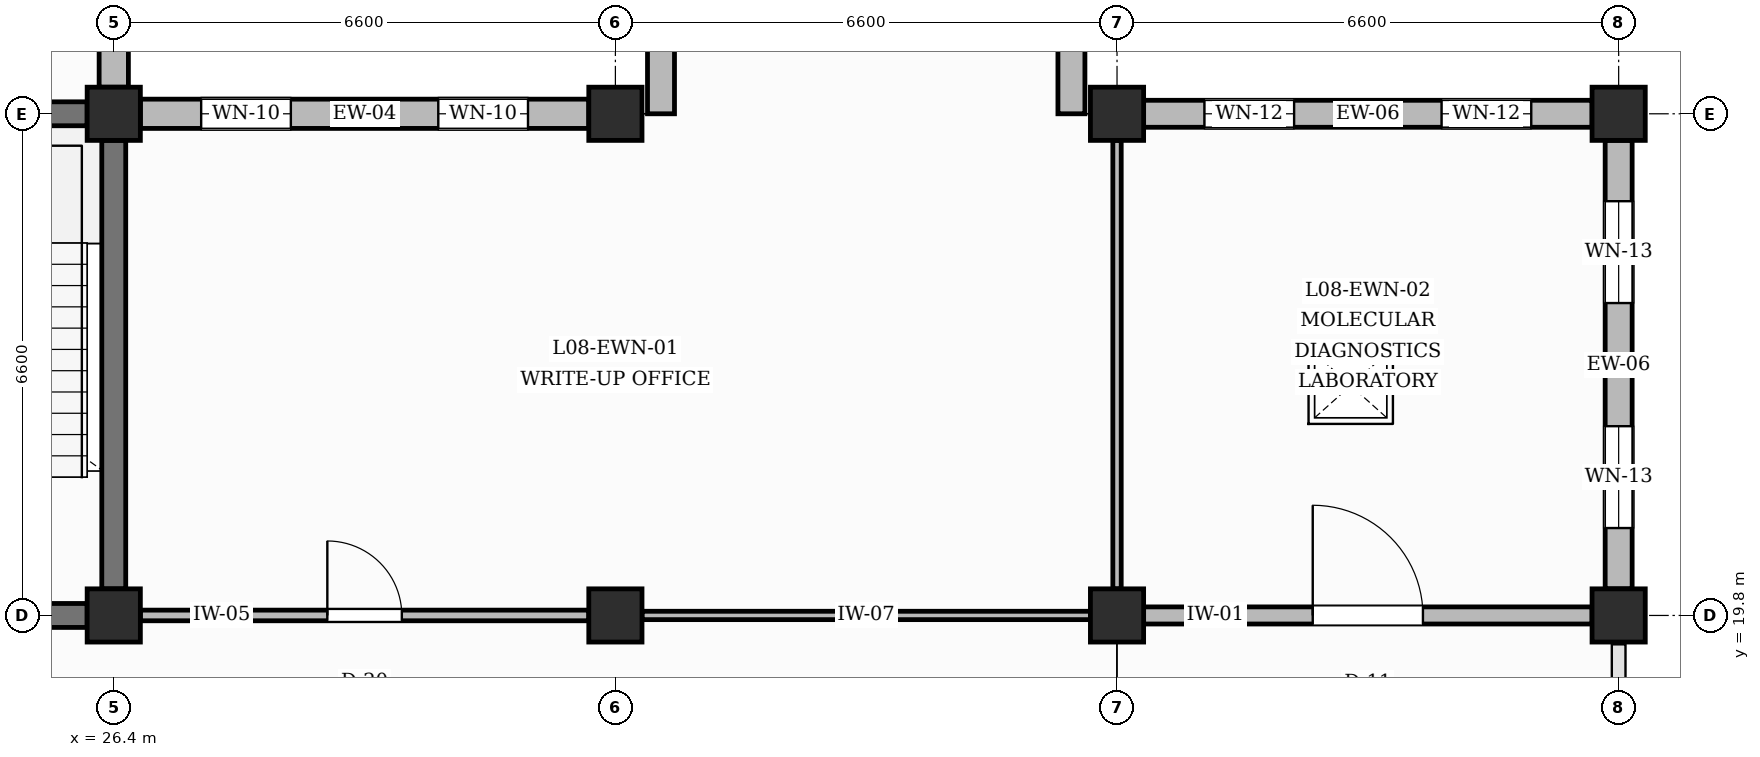
"""IFC4 building model, lengths in metres.
Left out: names, types, materials, properties, quantities, classifications, styles, units other than length and angle.
Written with IfcOpenShell. Run it as: python <this file> out.ifc"""

import sys

from ifc_helpers import new_model, si_unit, direction, frame, frame_2d, origin, origin_2d, place, context, subcontext, project, spatial, rectangle, extrude, element, fill, save


model = new_model("IFC4")
c1 = context("Model", 3, precision=1e-05, world=origin(), true_north=direction((0.0, 1.0)))
c2 = subcontext(c1, "Body", "Model", "MODEL_VIEW")
j1 = project(units=[si_unit("LENGTHUNIT", "METRE"), si_unit("PLANEANGLEUNIT", "RADIAN")], contexts=[c1])
p1 = place(None, origin())
s1 = spatial("IfcSite", under=j1, at=p1, CompositionType="ELEMENT")
p2 = place(p1, origin())
s2 = spatial("IfcBuilding", under=s1, at=p2, CompositionType="ELEMENT")
p3 = place(p2, frame((0.0, 0.0, 35.4)))
s3 = spatial("IfcBuildingStorey", under=s2, at=p3, CompositionType="ELEMENT", Elevation=35.4)
for number, where, z_axis, x_axis in (
    (1, (26.4, 19.8, 0.0), (0.0, 0.0, 1.0), (1.0, 0.0, 0.0)),
    (2, (26.4, 26.4, 0.0), (0.0, 0.0, 1.0), (1.0, 0.0, 0.0)),
    (3, (33.0, 19.8, 0.0), (0.0, 0.0, 1.0), (1.0, 0.0, 0.0)),
    (4, (33.0, 26.4, 0.0), (0.0, 0.0, 1.0), (1.0, 0.0, 0.0)),
    (5, (39.6, 19.8, 0.0), (0.0, 0.0, 1.0), (1.0, 0.0, 0.0)),
    (6, (39.6, 26.4, 0.0), (0.0, 0.0, 1.0), (1.0, 0.0, 0.0)),
    (7, (46.2, 19.8, 0.0), (0.0, 0.0, 1.0), (1.0, 0.0, 0.0)),
    (8, (46.2, 26.4, 0.0), (0.0, 0.0, 1.0), (1.0, 0.0, 0.0)),
):
    element("IfcColumn", number, at=place(p3, frame(where, z_axis=z_axis, x_axis=x_axis)), inside=s3, PredefinedType="COLUMN", context=c2, shape_type="SweptSolid", body=[
        extrude(rectangle(XDim=0.7, YDim=0.7, at=origin_2d()), origin(), (0.0, 0.0, 1.0), 4.2),
    ])
p4 = place(p3, frame((26.4, 26.75, 0.0), z_axis=(0.0, 0.0, 1.0), x_axis=(0.0, 1.0, 0.0)))
e9 = element("IfcWall", 9, at=p4, inside=s3, PredefinedType="SOLIDWALL", context=c2, shape_type="SweptSolid", body=[
    extrude(rectangle(XDim=5.9, YDim=0.385, at=frame_2d((2.95, 0.0))), origin(), (0.0, 0.0, 1.0), 3.28),
])
p5 = place(p4, frame((0.8, 0.0, 0.95)))
e10 = element("IfcOpeningElement", 10, at=p5, cuts=e9, PredefinedType="OPENING", context=c2, shape_type="SweptSolid", body=[
    extrude(rectangle(XDim=1.02, YDim=1.96, at=frame_2d((0.51, 0.98))), frame((0.0, 0.202, 0.0), z_axis=(0.0, -1.0, 0.0), x_axis=(1.0, 0.0, 0.0)), (0.0, 0.0, 1.0), 0.405),
])
p6 = place(p4, frame((4.08, 0.0, 0.95)))
e11 = element("IfcOpeningElement", 11, at=p6, cuts=e9, PredefinedType="OPENING", context=c2, shape_type="SweptSolid", body=[
    extrude(rectangle(XDim=1.02, YDim=1.96, at=frame_2d((0.51, 0.98))), frame((0.0, 0.202, 0.0), z_axis=(0.0, -1.0, 0.0), x_axis=(1.0, 0.0, 0.0)), (0.0, 0.0, 1.0), 0.405),
])
p7 = place(p3, frame((26.75, 26.4, 0.0), z_axis=(0.0, 0.0, 1.0), x_axis=(1.0, 0.0, 0.0)))
e12 = element("IfcWall", 12, at=p7, inside=s3, PredefinedType="SOLIDWALL", context=c2, shape_type="SweptSolid", body=[
    extrude(rectangle(XDim=5.9, YDim=0.385, at=frame_2d((2.95, 0.0))), origin(), (0.0, 0.0, 1.0), 3.28),
])
p8 = place(p7, frame((0.8, 0.0, 0.95)))
e13 = element("IfcOpeningElement", 13, at=p8, cuts=e12, PredefinedType="OPENING", context=c2, shape_type="SweptSolid", body=[
    extrude(rectangle(XDim=1.18, YDim=1.52, at=frame_2d((0.59, 0.76))), frame((0.0, 0.202, 0.0), z_axis=(0.0, -1.0, 0.0), x_axis=(1.0, 0.0, 0.0)), (0.0, 0.0, 1.0), 0.405),
])
p9 = place(p7, frame((3.92, 0.0, 0.95)))
e14 = element("IfcOpeningElement", 14, at=p9, cuts=e12, PredefinedType="OPENING", context=c2, shape_type="SweptSolid", body=[
    extrude(rectangle(XDim=1.18, YDim=1.52, at=frame_2d((0.59, 0.76))), frame((0.0, 0.202, 0.0), z_axis=(0.0, -1.0, 0.0), x_axis=(1.0, 0.0, 0.0)), (0.0, 0.0, 1.0), 0.405),
])
for number, where, z_axis, x_axis in (
    (15, (33.6, 26.4, 0.0), (0.0, 0.0, 1.0), (0.0, 1.0, 0.0)),
    (16, (39.0, 26.4, 0.0), (0.0, 0.0, 1.0), (0.0, 1.0, 0.0)),
):
    element("IfcWall", number, at=place(p3, frame(where, z_axis=z_axis, x_axis=x_axis)), inside=s3, PredefinedType="SOLIDWALL", context=c2, shape_type="SweptSolid", body=[
        extrude(rectangle(XDim=2.0, YDim=0.355, at=frame_2d((1.0, 0.0))), origin(), (0.0, 0.0, 1.0), 3.28),
    ])
p10 = place(p3, frame((39.95, 26.4, 0.0), z_axis=(0.0, 0.0, 1.0), x_axis=(1.0, 0.0, 0.0)))
e17 = element("IfcWall", 17, at=p10, inside=s3, PredefinedType="SOLIDWALL", context=c2, shape_type="SweptSolid", body=[
    extrude(rectangle(XDim=5.9, YDim=0.355, at=frame_2d((2.95, 0.0))), origin(), (0.0, 0.0, 1.0), 3.28),
])
p11 = place(p10, frame((0.8, 0.0, 0.95)))
e18 = element("IfcOpeningElement", 18, at=p11, cuts=e17, PredefinedType="OPENING", context=c2, shape_type="SweptSolid", body=[
    extrude(rectangle(XDim=1.18, YDim=1.96, at=frame_2d((0.59, 0.98))), frame((0.0, 0.188, 0.0), z_axis=(0.0, -1.0, 0.0), x_axis=(1.0, 0.0, 0.0)), (0.0, 0.0, 1.0), 0.375),
])
p12 = place(p10, frame((3.92, 0.0, 0.95)))
e19 = element("IfcOpeningElement", 19, at=p12, cuts=e17, PredefinedType="OPENING", context=c2, shape_type="SweptSolid", body=[
    extrude(rectangle(XDim=1.18, YDim=1.96, at=frame_2d((0.59, 0.98))), frame((0.0, 0.188, 0.0), z_axis=(0.0, -1.0, 0.0), x_axis=(1.0, 0.0, 0.0)), (0.0, 0.0, 1.0), 0.375),
])
p13 = place(p3, frame((46.2, 20.15, 0.0), z_axis=(0.0, 0.0, 1.0), x_axis=(0.0, 1.0, 0.0)))
e20 = element("IfcWall", 20, at=p13, inside=s3, PredefinedType="SOLIDWALL", context=c2, shape_type="SweptSolid", body=[
    extrude(rectangle(XDim=5.9, YDim=0.355, at=frame_2d((2.95, 0.0))), origin(), (0.0, 0.0, 1.0), 3.28),
])
p14 = place(p13, frame((0.8, 0.0, 0.95)))
e21 = element("IfcOpeningElement", 21, at=p14, cuts=e20, PredefinedType="OPENING", context=c2, shape_type="SweptSolid", body=[
    extrude(rectangle(XDim=1.34, YDim=1.3, at=frame_2d((0.67, 0.65))), frame((0.0, 0.188, 0.0), z_axis=(0.0, -1.0, 0.0), x_axis=(1.0, 0.0, 0.0)), (0.0, 0.0, 1.0), 0.375),
])
p15 = place(p13, frame((3.76, 0.0, 0.95)))
e22 = element("IfcOpeningElement", 22, at=p15, cuts=e20, PredefinedType="OPENING", context=c2, shape_type="SweptSolid", body=[
    extrude(rectangle(XDim=1.34, YDim=1.3, at=frame_2d((0.67, 0.65))), frame((0.0, 0.188, 0.0), z_axis=(0.0, -1.0, 0.0), x_axis=(1.0, 0.0, 0.0)), (0.0, 0.0, 1.0), 0.375),
])
p16 = place(p3, frame((20.15, 19.8, 0.0), z_axis=(0.0, 0.0, 1.0), x_axis=(1.0, 0.0, 0.0)))
e23 = element("IfcWall", 23, at=p16, inside=s3, PredefinedType="SHEAR", context=c2, shape_type="SweptSolid", body=[
    extrude(rectangle(XDim=5.9, YDim=0.315, at=frame_2d((2.95, 0.0))), origin(), (0.0, 0.0, 1.0), 3.18),
])
p17 = place(p16, frame((2.375, 0.0, 0.0)))
e24 = element("IfcOpeningElement", 24, at=p17, cuts=e23, PredefinedType="OPENING", context=c2, shape_type="SweptSolid", body=[
    extrude(rectangle(XDim=1.15, YDim=2.2, at=frame_2d((0.575, 1.1))), frame((0.0, 0.167, 0.0), z_axis=(0.0, -1.0, 0.0), x_axis=(1.0, 0.0, 0.0)), (0.0, 0.0, 1.0), 0.335),
])
for number, where, z_axis, x_axis in (
    (25, (20.15, 26.4, 0.0), (0.0, 0.0, 1.0), (1.0, 0.0, 0.0)),
    (26, (26.4, 20.15, 0.0), (0.0, 0.0, 1.0), (0.0, 1.0, 0.0)),
):
    element("IfcWall", number, at=place(p3, frame(where, z_axis=z_axis, x_axis=x_axis)), inside=s3, PredefinedType="SHEAR", context=c2, shape_type="SweptSolid", body=[
        extrude(rectangle(XDim=5.9, YDim=0.315, at=frame_2d((2.95, 0.0))), origin(), (0.0, 0.0, 1.0), 3.18),
    ])
p18 = place(p3, frame((26.75, 19.8, 0.0), z_axis=(0.0, 0.0, 1.0), x_axis=(1.0, 0.0, 0.0)))
e27 = element("IfcWall", 27, at=p18, inside=s3, PredefinedType="PARTITIONING", context=c2, shape_type="SweptSolid", body=[
    extrude(rectangle(XDim=5.9, YDim=0.14, at=frame_2d((2.95, 0.0))), origin(), (0.0, 0.0, 1.0), 3.18),
])
p19 = place(p18, frame((2.46, 0.0, 0.0)))
e28 = element("IfcOpeningElement", 28, at=p19, cuts=e27, PredefinedType="OPENING", context=c2, shape_type="SweptSolid", body=[
    extrude(rectangle(XDim=0.98, YDim=2.15, at=frame_2d((0.49, 1.075))), frame((0.0, 0.08, 0.0), z_axis=(0.0, -1.0, 0.0), x_axis=(1.0, 0.0, 0.0)), (0.0, 0.0, 1.0), 0.16),
])
p20 = place(p3, frame((33.35, 19.8, 0.0), z_axis=(0.0, 0.0, 1.0), x_axis=(1.0, 0.0, 0.0)))
e29 = element("IfcWall", 29, at=p20, inside=s3, PredefinedType="PARTITIONING", context=c2, shape_type="SweptSolid", body=[
    extrude(rectangle(XDim=5.9, YDim=0.11, at=frame_2d((2.95, 0.0))), origin(), (0.0, 0.0, 1.0), 3.18),
])
p21 = place(p3, frame((39.6, 20.15, 0.0), z_axis=(0.0, 0.0, 1.0), x_axis=(0.0, 1.0, 0.0)))
e30 = element("IfcWall", 30, at=p21, inside=s3, PredefinedType="PARTITIONING", context=c2, shape_type="SweptSolid", body=[
    extrude(rectangle(XDim=5.9, YDim=0.11, at=frame_2d((2.95, 0.0))), origin(), (0.0, 0.0, 1.0), 3.43),
])
p22 = place(p3, frame((39.95, 19.8, 0.0), z_axis=(0.0, 0.0, 1.0), x_axis=(1.0, 0.0, 0.0)))
e31 = element("IfcWall", 31, at=p22, inside=s3, PredefinedType="PARTITIONING", context=c2, shape_type="SweptSolid", body=[
    extrude(rectangle(XDim=5.9, YDim=0.225, at=frame_2d((2.95, 0.0))), origin(), (0.0, 0.0, 1.0), 3.18),
])
p23 = place(p22, frame((2.225, 0.0, 0.0)))
e32 = element("IfcOpeningElement", 32, at=p23, cuts=e31, PredefinedType="OPENING", context=c2, shape_type="SweptSolid", body=[
    extrude(rectangle(XDim=1.45, YDim=2.25, at=frame_2d((0.725, 1.125))), frame((0.0, 0.123, 0.0), z_axis=(0.0, -1.0, 0.0), x_axis=(1.0, 0.0, 0.0)), (0.0, 0.0, 1.0), 0.245),
])
p24 = place(p8, origin())
e33 = element("IfcWindow", 33, at=p24, inside=s3, PartitioningType="SINGLE_PANEL", PredefinedType="WINDOW", context=c2, shape_type="SweptSolid", body=[
    extrude(rectangle(XDim=1.18, YDim=1.52, at=frame_2d((0.59, 0.76))), frame((0.0, 0.03, 0.0), z_axis=(0.0, -1.0, 0.0), x_axis=(1.0, 0.0, 0.0)), (0.0, 0.0, 1.0), 0.06),
])
fill(e13, e33)
p25 = place(p9, origin())
e34 = element("IfcWindow", 34, at=p25, inside=s3, PartitioningType="SINGLE_PANEL", PredefinedType="WINDOW", context=c2, shape_type="SweptSolid", body=[
    extrude(rectangle(XDim=1.18, YDim=1.52, at=frame_2d((0.59, 0.76))), frame((0.0, 0.03, 0.0), z_axis=(0.0, -1.0, 0.0), x_axis=(1.0, 0.0, 0.0)), (0.0, 0.0, 1.0), 0.06),
])
fill(e14, e34)
p26 = place(p11, origin())
e35 = element("IfcWindow", 35, at=p26, inside=s3, PartitioningType="SINGLE_PANEL", PredefinedType="WINDOW", context=c2, shape_type="SweptSolid", body=[
    extrude(rectangle(XDim=1.18, YDim=1.96, at=frame_2d((0.59, 0.98))), frame((0.0, 0.03, 0.0), z_axis=(0.0, -1.0, 0.0), x_axis=(1.0, 0.0, 0.0)), (0.0, 0.0, 1.0), 0.06),
])
fill(e18, e35)
p27 = place(p12, origin())
e36 = element("IfcWindow", 36, at=p27, inside=s3, PartitioningType="SINGLE_PANEL", PredefinedType="WINDOW", context=c2, shape_type="SweptSolid", body=[
    extrude(rectangle(XDim=1.18, YDim=1.96, at=frame_2d((0.59, 0.98))), frame((0.0, 0.03, 0.0), z_axis=(0.0, -1.0, 0.0), x_axis=(1.0, 0.0, 0.0)), (0.0, 0.0, 1.0), 0.06),
])
fill(e19, e36)
p28 = place(p14, origin())
e37 = element("IfcWindow", 37, at=p28, inside=s3, PartitioningType="SINGLE_PANEL", PredefinedType="WINDOW", context=c2, shape_type="SweptSolid", body=[
    extrude(rectangle(XDim=1.34, YDim=1.3, at=frame_2d((0.67, 0.65))), frame((0.0, 0.03, 0.0), z_axis=(0.0, -1.0, 0.0), x_axis=(1.0, 0.0, 0.0)), (0.0, 0.0, 1.0), 0.06),
])
fill(e21, e37)
p29 = place(p15, origin())
e38 = element("IfcWindow", 38, at=p29, inside=s3, PartitioningType="SINGLE_PANEL", PredefinedType="WINDOW", context=c2, shape_type="SweptSolid", body=[
    extrude(rectangle(XDim=1.34, YDim=1.3, at=frame_2d((0.67, 0.65))), frame((0.0, 0.03, 0.0), z_axis=(0.0, -1.0, 0.0), x_axis=(1.0, 0.0, 0.0)), (0.0, 0.0, 1.0), 0.06),
])
fill(e22, e38)
p30 = place(p19, origin())
e39 = element("IfcDoor", 39, at=p30, inside=s3, OperationType="SINGLE_SWING_LEFT", PredefinedType="DOOR", context=c2, shape_type="SweptSolid", body=[
    extrude(rectangle(XDim=0.98, YDim=2.15, at=frame_2d((0.49, 1.075))), frame((0.0, 0.025, 0.0), z_axis=(0.0, -1.0, 0.0), x_axis=(1.0, 0.0, 0.0)), (0.0, 0.0, 1.0), 0.05),
])
fill(e28, e39)
p31 = place(p23, origin())
e40 = element("IfcDoor", 40, at=p31, inside=s3, OperationType="SINGLE_SWING_LEFT", PredefinedType="DOOR", context=c2, shape_type="SweptSolid", body=[
    extrude(rectangle(XDim=1.45, YDim=2.25, at=frame_2d((0.725, 1.125))), frame((0.0, 0.025, 0.0), z_axis=(0.0, -1.0, 0.0), x_axis=(1.0, 0.0, 0.0)), (0.0, 0.0, 1.0), 0.05),
])
fill(e32, e40)
save(model, sys.argv[1])
